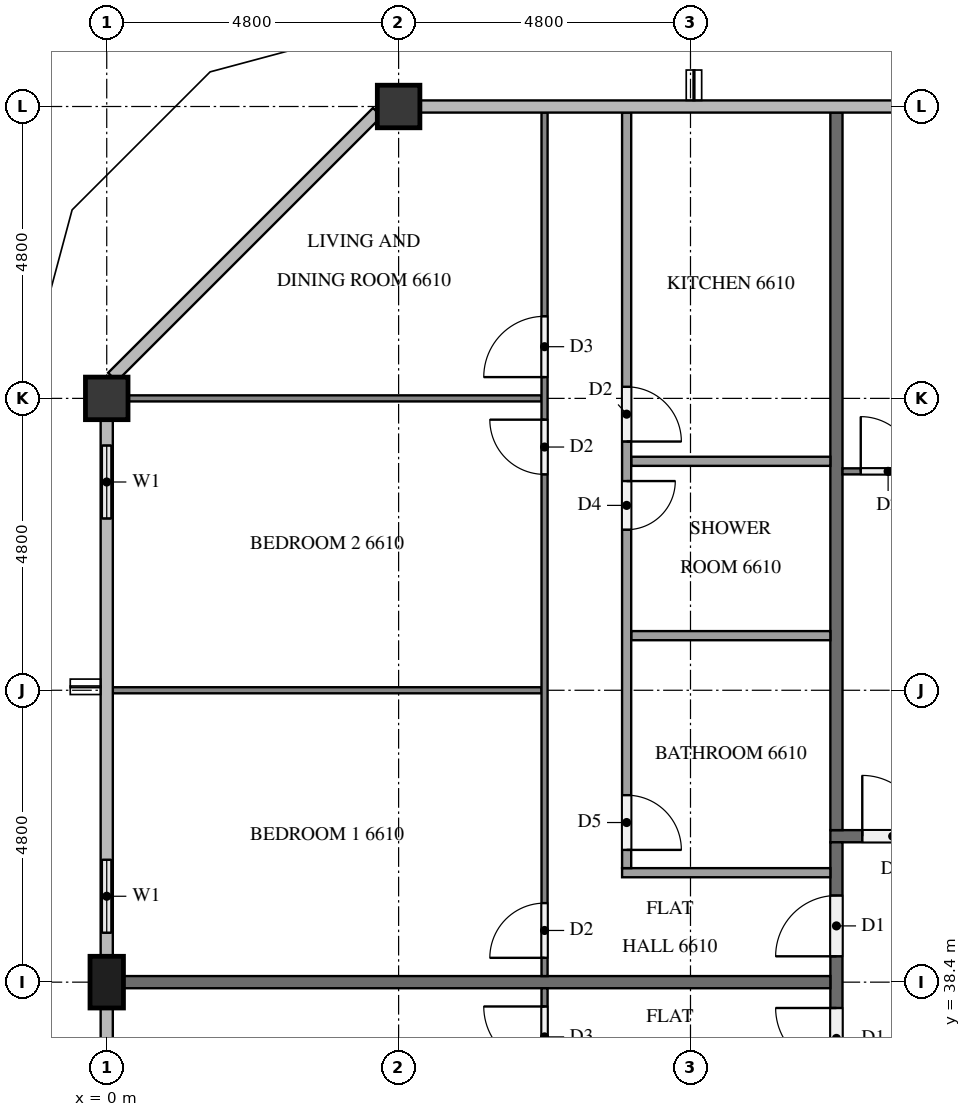
"""IFC4 building model, lengths in metres.
Left out: names, types, materials, properties, quantities, classifications, styles, units other than length and angle.
Written with IfcOpenShell. Run it as: python <this file> out.ifc"""

import sys

from ifc_helpers import new_model, si_unit, direction, frame, frame_2d, origin, origin_2d, place, context, subcontext, project, spatial, rectangle, extrude, element, fill, save


model = new_model("IFC4")
c1 = context("Model", 3, precision=1e-05, world=origin(), true_north=direction((0.0, 1.0)))
c2 = subcontext(c1, "Body", "Model", "MODEL_VIEW")
j1 = project(units=[si_unit("LENGTHUNIT", "METRE"), si_unit("PLANEANGLEUNIT", "RADIAN")], contexts=[c1])
p1 = place(None, origin())
s1 = spatial("IfcSite", under=j1, at=p1, CompositionType="ELEMENT")
p2 = place(p1, origin())
s2 = spatial("IfcBuilding", under=s1, at=p2, CompositionType="ELEMENT")
p3 = place(p2, frame((0.0, 0.0, 252.7)))
s3 = spatial("IfcBuildingStorey", under=s2, at=p3, CompositionType="ELEMENT", Elevation=252.7)
for number, where, z_axis, x_axis in (
    (1, (4.8, 52.8, 0.0), (0.0, 0.0, 1.0), (1.0, 0.0, 0.0)),
    (2, (0.0, 48.0, 0.0), (0.0, 0.0, 1.0), (1.0, 0.0, 0.0)),
):
    element("IfcColumn", number, at=place(p3, frame(where, z_axis=z_axis, x_axis=x_axis)), inside=s3, PredefinedType="COLUMN", context=c2, shape_type="SweptSolid", body=[
        extrude(rectangle(XDim=0.7, YDim=0.7, at=origin_2d()), origin(), (0.0, 0.0, 1.0), 3.2),
    ])
p4 = place(p3, frame((0.0, 38.4, 0.0), z_axis=(0.0, 0.0, 1.0), x_axis=(0.0, 1.0, 0.0)))
e3 = element("IfcColumn", 3, at=p4, inside=s3, PredefinedType="COLUMN", context=c2, shape_type="SweptSolid", body=[
    extrude(rectangle(XDim=0.85, YDim=0.55, at=origin_2d()), origin(), (0.0, 0.0, 1.0), 3.2),
])
p5 = place(p3, frame((0.0, 47.65, 0.0), z_axis=(0.0, 0.0, 1.0), x_axis=(0.0, -1.0, 0.0)))
e4 = element("IfcWall", 4, at=p5, inside=s3, PredefinedType="SOLIDWALL", context=c2, shape_type="SweptSolid", body=[
    extrude(rectangle(XDim=2.05, YDim=0.15, at=frame_2d((1.025, 0.0))), origin(), (0.0, 0.0, 1.0), 3.2),
])
p6 = place(p5, frame((0.425, 0.0, 0.9)))
e5 = element("IfcOpeningElement", 5, at=p6, cuts=e4, PredefinedType="OPENING", context=c2, shape_type="SweptSolid", body=[
    extrude(rectangle(XDim=1.2, YDim=1.4, at=frame_2d((0.6, 0.7))), frame((0.0, 0.085, 0.0), z_axis=(0.0, -1.0, 0.0), x_axis=(1.0, 0.0, 0.0)), (0.0, 0.0, 1.0), 0.17),
])
p7 = place(p3, frame((0.0, 40.8, 0.0), z_axis=(0.0, 0.0, 1.0), x_axis=(0.0, -1.0, 0.0)))
e6 = element("IfcWall", 6, at=p7, inside=s3, PredefinedType="SOLIDWALL", context=c2, shape_type="SweptSolid", body=[
    extrude(rectangle(XDim=1.975, YDim=0.15, at=frame_2d((0.988, 0.0))), origin(), (0.0, 0.0, 1.0), 3.2),
])
p8 = place(p7, frame((0.387, 0.0, 0.9)))
e7 = element("IfcOpeningElement", 7, at=p8, cuts=e6, PredefinedType="OPENING", context=c2, shape_type="SweptSolid", body=[
    extrude(rectangle(XDim=1.2, YDim=1.4, at=frame_2d((0.6, 0.7))), frame((0.0, 0.085, 0.0), z_axis=(0.0, -1.0, 0.0), x_axis=(1.0, 0.0, 0.0)), (0.0, 0.0, 1.0), 0.17),
])
p9 = place(p3, frame((11.9, 40.8, 0.0), z_axis=(0.0, 0.0, 1.0), x_axis=(1.0, 0.0, 0.0)))
e8 = element("IfcWall", 8, at=p9, inside=s3, PredefinedType="PARTITIONING", context=c2, shape_type="SweptSolid", body=[
    extrude(rectangle(XDim=38.6, YDim=0.2, at=frame_2d((19.3, 0.0))), origin(), (0.0, 0.0, 1.0), 3.2),
])
p10 = place(p9, frame((31.725, 0.0, 0.0)))
e9 = element("IfcOpeningElement", 9, at=p10, cuts=e8, PredefinedType="OPENING", context=c2, shape_type="SweptSolid", body=[
    extrude(rectangle(XDim=1.0, YDim=2.1, at=frame_2d((0.5, 1.05))), frame((0.0, 0.11, 0.0), z_axis=(0.0, -1.0, 0.0), x_axis=(1.0, 0.0, 0.0)), (0.0, 0.0, 1.0), 0.22),
])
p11 = place(p9, frame((17.325, 0.0, 0.0)))
e10 = element("IfcOpeningElement", 10, at=p11, cuts=e8, PredefinedType="OPENING", context=c2, shape_type="SweptSolid", body=[
    extrude(rectangle(XDim=1.0, YDim=2.1, at=frame_2d((0.5, 1.05))), frame((0.0, 0.11, 0.0), z_axis=(0.0, -1.0, 0.0), x_axis=(1.0, 0.0, 0.0)), (0.0, 0.0, 1.0), 0.22),
])
p12 = place(p9, frame((0.525, 0.0, 0.0)))
e11 = element("IfcOpeningElement", 11, at=p12, cuts=e8, PredefinedType="OPENING", context=c2, shape_type="SweptSolid", body=[
    extrude(rectangle(XDim=1.0, YDim=2.1, at=frame_2d((0.5, 1.05))), frame((0.0, 0.11, 0.0), z_axis=(0.0, -1.0, 0.0), x_axis=(1.0, 0.0, 0.0)), (0.0, 0.0, 1.0), 0.22),
])
p13 = place(p3, frame((12.0, 12.1, 0.0), z_axis=(0.0, 0.0, 1.0), x_axis=(0.0, 1.0, 0.0)))
e12 = element("IfcWall", 12, at=p13, inside=s3, PredefinedType="PARTITIONING", context=c2, shape_type="SweptSolid", body=[
    extrude(rectangle(XDim=28.6, YDim=0.2, at=frame_2d((14.3, 0.0))), origin(), (0.0, 0.0, 1.0), 3.2),
])
p14 = place(p13, frame((26.725, 0.0, 0.0)))
e13 = element("IfcOpeningElement", 13, at=p14, cuts=e12, PredefinedType="OPENING", context=c2, shape_type="SweptSolid", body=[
    extrude(rectangle(XDim=1.0, YDim=2.1, at=frame_2d((0.5, 1.05))), frame((0.0, 0.11, 0.0), z_axis=(0.0, -1.0, 0.0), x_axis=(1.0, 0.0, 0.0)), (0.0, 0.0, 1.0), 0.22),
])
p15 = place(p13, frame((24.875, 0.0, 0.0)))
e14 = element("IfcOpeningElement", 14, at=p15, cuts=e12, PredefinedType="OPENING", context=c2, shape_type="SweptSolid", body=[
    extrude(rectangle(XDim=1.0, YDim=2.1, at=frame_2d((0.5, 1.05))), frame((0.0, 0.11, 0.0), z_axis=(0.0, -1.0, 0.0), x_axis=(1.0, 0.0, 0.0)), (0.0, 0.0, 1.0), 0.22),
])
p16 = place(p13, frame((17.675, 0.0, 0.0)))
e15 = element("IfcOpeningElement", 15, at=p16, cuts=e12, PredefinedType="OPENING", context=c2, shape_type="SweptSolid", body=[
    extrude(rectangle(XDim=1.0, YDim=2.1, at=frame_2d((0.5, 1.05))), frame((0.0, 0.11, 0.0), z_axis=(0.0, -1.0, 0.0), x_axis=(1.0, 0.0, 0.0)), (0.0, 0.0, 1.0), 0.22),
])
p17 = place(p13, frame((2.725, 0.0, 0.0)))
e16 = element("IfcOpeningElement", 16, at=p17, cuts=e12, PredefinedType="OPENING", context=c2, shape_type="SweptSolid", body=[
    extrude(rectangle(XDim=1.0, YDim=2.1, at=frame_2d((0.5, 1.05))), frame((0.0, 0.11, 0.0), z_axis=(0.0, -1.0, 0.0), x_axis=(1.0, 0.0, 0.0)), (0.0, 0.0, 1.0), 0.22),
])
p18 = place(p13, frame((0.875, 0.0, 0.0)))
e17 = element("IfcOpeningElement", 17, at=p18, cuts=e12, PredefinedType="OPENING", context=c2, shape_type="SweptSolid", body=[
    extrude(rectangle(XDim=1.0, YDim=2.1, at=frame_2d((0.5, 1.05))), frame((0.0, 0.11, 0.0), z_axis=(0.0, -1.0, 0.0), x_axis=(1.0, 0.0, 0.0)), (0.0, 0.0, 1.0), 0.22),
])
p19 = place(p3, frame((12.0, 52.7, 0.0), z_axis=(0.0, 0.0, 1.0), x_axis=(0.0, -1.0, 0.0)))
e18 = element("IfcWall", 18, at=p19, inside=s3, PredefinedType="PARTITIONING", context=c2, shape_type="SweptSolid", body=[
    extrude(rectangle(XDim=11.8, YDim=0.2, at=frame_2d((5.9, 0.0))), origin(), (0.0, 0.0, 1.0), 3.2),
])
p20 = place(p3, frame((0.275, 38.4, 0.0), z_axis=(0.0, 0.0, 1.0), x_axis=(1.0, 0.0, 0.0)))
e19 = element("IfcWall", 19, at=p20, inside=s3, PredefinedType="PARTITIONING", context=c2, shape_type="SweptSolid", body=[
    extrude(rectangle(XDim=11.625, YDim=0.2, at=frame_2d((5.812, 0.0))), origin(), (0.0, 0.0, 1.0), 3.2),
])
p21 = place(p3, frame((12.1, 46.8, 0.0), z_axis=(0.0, 0.0, 1.0), x_axis=(1.0, 0.0, 0.0)))
e20 = element("IfcWall", 20, at=p21, inside=s3, PredefinedType="PARTITIONING", context=c2, shape_type="SweptSolid", body=[
    extrude(rectangle(XDim=16.6, YDim=0.1, at=frame_2d((8.3, 0.0))), origin(), (0.0, 0.0, 1.0), 3.2),
])
p22 = place(p21, frame((0.3, 0.0, 0.0)))
e21 = element("IfcOpeningElement", 21, at=p22, cuts=e20, PredefinedType="OPENING", context=c2, shape_type="SweptSolid", body=[
    extrude(rectangle(XDim=0.9, YDim=2.1, at=frame_2d((0.45, 1.05))), frame((0.0, 0.06, 0.0), z_axis=(0.0, -1.0, 0.0), x_axis=(1.0, 0.0, 0.0)), (0.0, 0.0, 1.0), 0.12),
])
p23 = place(p21, frame((8.25, 0.0, 0.0)))
e22 = element("IfcOpeningElement", 22, at=p23, cuts=e20, PredefinedType="OPENING", context=c2, shape_type="SweptSolid", body=[
    extrude(rectangle(XDim=0.9, YDim=2.1, at=frame_2d((0.45, 1.05))), frame((0.0, 0.06, 0.0), z_axis=(0.0, -1.0, 0.0), x_axis=(1.0, 0.0, 0.0)), (0.0, 0.0, 1.0), 0.12),
])
p24 = place(p21, frame((9.85, 0.0, 0.0)))
e23 = element("IfcOpeningElement", 23, at=p24, cuts=e20, PredefinedType="OPENING", context=c2, shape_type="SweptSolid", body=[
    extrude(rectangle(XDim=1.0, YDim=2.1, at=frame_2d((0.5, 1.05))), frame((0.0, 0.06, 0.0), z_axis=(0.0, -1.0, 0.0), x_axis=(1.0, 0.0, 0.0)), (0.0, 0.0, 1.0), 0.12),
])
p25 = place(p3, frame((7.15, 43.2, 0.0), z_axis=(0.0, 0.0, 1.0), x_axis=(-1.0, 0.0, 0.0)))
e24 = element("IfcWall", 24, at=p25, inside=s3, PredefinedType="PARTITIONING", context=c2, shape_type="SweptSolid", body=[
    extrude(rectangle(XDim=7.05, YDim=0.1, at=frame_2d((3.525, 0.0))), origin(), (0.0, 0.0, 1.0), 3.2),
])
p26 = place(p3, frame((7.15, 48.0, 0.0), z_axis=(0.0, 0.0, 1.0), x_axis=(-1.0, 0.0, 0.0)))
e25 = element("IfcWall", 25, at=p26, inside=s3, PredefinedType="PARTITIONING", context=c2, shape_type="SweptSolid", body=[
    extrude(rectangle(XDim=6.8, YDim=0.1, at=frame_2d((3.4, 0.0))), origin(), (0.0, 0.0, 1.0), 3.2),
])
p27 = place(p3, frame((7.2, 38.5, 0.0), z_axis=(0.0, 0.0, 1.0), x_axis=(0.0, 1.0, 0.0)))
e26 = element("IfcWall", 26, at=p27, inside=s3, PredefinedType="PARTITIONING", context=c2, shape_type="SweptSolid", body=[
    extrude(rectangle(XDim=14.2, YDim=0.1, at=frame_2d((7.1, 0.0))), origin(), (0.0, 0.0, 1.0), 3.2),
])
p28 = place(p27, frame((0.3, 0.0, 0.0)))
e27 = element("IfcOpeningElement", 27, at=p28, cuts=e26, PredefinedType="OPENING", context=c2, shape_type="SweptSolid", body=[
    extrude(rectangle(XDim=0.9, YDim=2.1, at=frame_2d((0.45, 1.05))), frame((0.0, 0.06, 0.0), z_axis=(0.0, -1.0, 0.0), x_axis=(1.0, 0.0, 0.0)), (0.0, 0.0, 1.0), 0.12),
])
p29 = place(p27, frame((8.25, 0.0, 0.0)))
e28 = element("IfcOpeningElement", 28, at=p29, cuts=e26, PredefinedType="OPENING", context=c2, shape_type="SweptSolid", body=[
    extrude(rectangle(XDim=0.9, YDim=2.1, at=frame_2d((0.45, 1.05))), frame((0.0, 0.06, 0.0), z_axis=(0.0, -1.0, 0.0), x_axis=(1.0, 0.0, 0.0)), (0.0, 0.0, 1.0), 0.12),
])
p30 = place(p27, frame((9.85, 0.0, 0.0)))
e29 = element("IfcOpeningElement", 29, at=p30, cuts=e26, PredefinedType="OPENING", context=c2, shape_type="SweptSolid", body=[
    extrude(rectangle(XDim=1.0, YDim=2.1, at=frame_2d((0.5, 1.05))), frame((0.0, 0.06, 0.0), z_axis=(0.0, -1.0, 0.0), x_axis=(1.0, 0.0, 0.0)), (0.0, 0.0, 1.0), 0.12),
])
for number, where, z_axis, x_axis in (
    (30, (11.9, 44.098, 0.0), (0.0, 0.0, 1.0), (-1.0, 0.0, 0.0)),
    (31, (11.9, 46.965, 0.0), (0.0, 0.0, 1.0), (-1.0, 0.0, 0.0)),
):
    element("IfcWall", number, at=place(p3, frame(where, z_axis=z_axis, x_axis=x_axis)), inside=s3, PredefinedType="PARTITIONING", context=c2, shape_type="SweptSolid", body=[
        extrude(rectangle(XDim=3.275, YDim=0.15, at=frame_2d((1.637, 0.0))), origin(), (0.0, 0.0, 1.0), 3.2),
    ])
p31 = place(p3, frame((11.9, 40.2, 0.0), z_axis=(0.0, 0.0, 1.0), x_axis=(-1.0, 0.0, 0.0)))
e32 = element("IfcWall", 32, at=p31, inside=s3, PredefinedType="PARTITIONING", context=c2, shape_type="SweptSolid", body=[
    extrude(rectangle(XDim=3.425, YDim=0.15, at=frame_2d((1.712, 0.0))), origin(), (0.0, 0.0, 1.0), 3.2),
])
p32 = place(p3, frame((8.55, 52.7, 0.0), z_axis=(0.0, 0.0, 1.0), x_axis=(0.0, -1.0, 0.0)))
e33 = element("IfcWall", 33, at=p32, inside=s3, PredefinedType="PARTITIONING", context=c2, shape_type="SweptSolid", body=[
    extrude(rectangle(XDim=12.425, YDim=0.15, at=frame_2d((6.212, 0.0))), origin(), (0.0, 0.0, 1.0), 3.2),
])
p33 = place(p32, frame((11.225, 0.0, 0.0)))
e34 = element("IfcOpeningElement", 34, at=p33, cuts=e33, PredefinedType="OPENING", context=c2, shape_type="SweptSolid", body=[
    extrude(rectangle(XDim=0.9, YDim=2.1, at=frame_2d((0.45, 1.05))), frame((0.0, 0.085, 0.0), z_axis=(0.0, -1.0, 0.0), x_axis=(1.0, 0.0, 0.0)), (0.0, 0.0, 1.0), 0.17),
])
p34 = place(p32, frame((6.06, 0.0, 0.0)))
e35 = element("IfcOpeningElement", 35, at=p34, cuts=e33, PredefinedType="OPENING", context=c2, shape_type="SweptSolid", body=[
    extrude(rectangle(XDim=0.8, YDim=2.1, at=frame_2d((0.4, 1.05))), frame((0.0, 0.085, 0.0), z_axis=(0.0, -1.0, 0.0), x_axis=(1.0, 0.0, 0.0)), (0.0, 0.0, 1.0), 0.17),
])
p35 = place(p32, frame((4.51, 0.0, 0.0)))
e36 = element("IfcOpeningElement", 36, at=p35, cuts=e33, PredefinedType="OPENING", context=c2, shape_type="SweptSolid", body=[
    extrude(rectangle(XDim=0.9, YDim=2.1, at=frame_2d((0.45, 1.05))), frame((0.0, 0.085, 0.0), z_axis=(0.0, -1.0, 0.0), x_axis=(1.0, 0.0, 0.0)), (0.0, 0.0, 1.0), 0.17),
])
p36 = place(p3, frame((7.2, 31.3, 0.0), z_axis=(0.0, 0.0, 1.0), x_axis=(0.0, 1.0, 0.0)))
e37 = element("IfcWall", 37, at=p36, inside=s3, PredefinedType="PARTITIONING", context=c2, shape_type="SweptSolid", body=[
    extrude(rectangle(XDim=7.0, YDim=0.1, at=frame_2d((3.5, 0.0))), origin(), (0.0, 0.0, 1.0), 3.2),
])
p37 = place(p36, frame((5.7, 0.0, 0.0)))
e38 = element("IfcOpeningElement", 38, at=p37, cuts=e37, PredefinedType="OPENING", context=c2, shape_type="SweptSolid", body=[
    extrude(rectangle(XDim=1.0, YDim=2.1, at=frame_2d((0.5, 1.05))), frame((0.0, 0.06, 0.0), z_axis=(0.0, -1.0, 0.0), x_axis=(1.0, 0.0, 0.0)), (0.0, 0.0, 1.0), 0.12),
])
p38 = place(p6, origin())
e39 = element("IfcWindow", 39, at=p38, inside=s3, PartitioningType="SINGLE_PANEL", PredefinedType="WINDOW", context=c2, shape_type="SweptSolid", body=[
    extrude(rectangle(XDim=1.2, YDim=1.4, at=frame_2d((0.6, 0.7))), frame((0.0, 0.03, 0.0), z_axis=(0.0, -1.0, 0.0), x_axis=(1.0, 0.0, 0.0)), (0.0, 0.0, 1.0), 0.06),
])
fill(e5, e39)
p39 = place(p8, origin())
e40 = element("IfcWindow", 40, at=p39, inside=s3, PartitioningType="SINGLE_PANEL", PredefinedType="WINDOW", context=c2, shape_type="SweptSolid", body=[
    extrude(rectangle(XDim=1.2, YDim=1.4, at=frame_2d((0.6, 0.7))), frame((0.0, 0.03, 0.0), z_axis=(0.0, -1.0, 0.0), x_axis=(1.0, 0.0, 0.0)), (0.0, 0.0, 1.0), 0.06),
])
fill(e7, e40)
p40 = place(p12, origin())
e41 = element("IfcDoor", 41, at=p40, inside=s3, OperationType="SINGLE_SWING_LEFT", PredefinedType="DOOR", context=c2, shape_type="SweptSolid", body=[
    extrude(rectangle(XDim=1.0, YDim=2.1, at=frame_2d((0.5, 1.05))), frame((0.0, 0.025, 0.0), z_axis=(0.0, -1.0, 0.0), x_axis=(1.0, 0.0, 0.0)), (0.0, 0.0, 1.0), 0.05),
])
fill(e11, e41)
p41 = place(p14, origin())
e42 = element("IfcDoor", 42, at=p41, inside=s3, OperationType="SINGLE_SWING_LEFT", PredefinedType="DOOR", context=c2, shape_type="SweptSolid", body=[
    extrude(rectangle(XDim=1.0, YDim=2.1, at=frame_2d((0.5, 1.05))), frame((0.0, 0.025, 0.0), z_axis=(0.0, -1.0, 0.0), x_axis=(1.0, 0.0, 0.0)), (0.0, 0.0, 1.0), 0.05),
])
fill(e13, e42)
p42 = place(p15, origin())
e43 = element("IfcDoor", 43, at=p42, inside=s3, OperationType="SINGLE_SWING_RIGHT", PredefinedType="DOOR", context=c2, shape_type="SweptSolid", body=[
    extrude(rectangle(XDim=1.0, YDim=2.1, at=frame_2d((0.5, 1.05))), frame((0.0, 0.025, 0.0), z_axis=(0.0, -1.0, 0.0), x_axis=(1.0, 0.0, 0.0)), (0.0, 0.0, 1.0), 0.05),
])
fill(e14, e43)
p43 = place(p22, origin())
e44 = element("IfcDoor", 44, at=p43, inside=s3, OperationType="SINGLE_SWING_LEFT", PredefinedType="DOOR", context=c2, shape_type="SweptSolid", body=[
    extrude(rectangle(XDim=0.9, YDim=2.1, at=frame_2d((0.45, 1.05))), frame((0.0, 0.025, 0.0), z_axis=(0.0, -1.0, 0.0), x_axis=(1.0, 0.0, 0.0)), (0.0, 0.0, 1.0), 0.05),
])
fill(e21, e44)
p44 = place(p28, origin())
e45 = element("IfcDoor", 45, at=p44, inside=s3, OperationType="SINGLE_SWING_LEFT", PredefinedType="DOOR", context=c2, shape_type="SweptSolid", body=[
    extrude(rectangle(XDim=0.9, YDim=2.1, at=frame_2d((0.45, 1.05))), frame((0.0, 0.025, 0.0), z_axis=(0.0, -1.0, 0.0), x_axis=(1.0, 0.0, 0.0)), (0.0, 0.0, 1.0), 0.05),
])
fill(e27, e45)
p45 = place(p29, origin())
e46 = element("IfcDoor", 46, at=p45, inside=s3, OperationType="SINGLE_SWING_RIGHT", PredefinedType="DOOR", context=c2, shape_type="SweptSolid", body=[
    extrude(rectangle(XDim=0.9, YDim=2.1, at=frame_2d((0.45, 1.05))), frame((0.0, 0.025, 0.0), z_axis=(0.0, -1.0, 0.0), x_axis=(1.0, 0.0, 0.0)), (0.0, 0.0, 1.0), 0.05),
])
fill(e28, e46)
p46 = place(p30, origin())
e47 = element("IfcDoor", 47, at=p46, inside=s3, OperationType="SINGLE_SWING_LEFT", PredefinedType="DOOR", context=c2, shape_type="SweptSolid", body=[
    extrude(rectangle(XDim=1.0, YDim=2.1, at=frame_2d((0.5, 1.05))), frame((0.0, 0.025, 0.0), z_axis=(0.0, -1.0, 0.0), x_axis=(1.0, 0.0, 0.0)), (0.0, 0.0, 1.0), 0.05),
])
fill(e29, e47)
p47 = place(p33, origin())
e48 = element("IfcDoor", 48, at=p47, inside=s3, OperationType="SINGLE_SWING_RIGHT", PredefinedType="DOOR", context=c2, shape_type="SweptSolid", body=[
    extrude(rectangle(XDim=0.9, YDim=2.1, at=frame_2d((0.45, 1.05))), frame((0.0, 0.025, 0.0), z_axis=(0.0, -1.0, 0.0), x_axis=(1.0, 0.0, 0.0)), (0.0, 0.0, 1.0), 0.05),
])
fill(e34, e48)
p48 = place(p34, origin())
e49 = element("IfcDoor", 49, at=p48, inside=s3, OperationType="SINGLE_SWING_LEFT", PredefinedType="DOOR", context=c2, shape_type="SweptSolid", body=[
    extrude(rectangle(XDim=0.8, YDim=2.1, at=frame_2d((0.4, 1.05))), frame((0.0, 0.025, 0.0), z_axis=(0.0, -1.0, 0.0), x_axis=(1.0, 0.0, 0.0)), (0.0, 0.0, 1.0), 0.05),
])
fill(e35, e49)
p49 = place(p35, origin())
e50 = element("IfcDoor", 50, at=p49, inside=s3, OperationType="SINGLE_SWING_RIGHT", PredefinedType="DOOR", context=c2, shape_type="SweptSolid", body=[
    extrude(rectangle(XDim=0.9, YDim=2.1, at=frame_2d((0.45, 1.05))), frame((0.0, 0.025, 0.0), z_axis=(0.0, -1.0, 0.0), x_axis=(1.0, 0.0, 0.0)), (0.0, 0.0, 1.0), 0.05),
])
fill(e36, e50)
p50 = place(p37, origin())
e51 = element("IfcDoor", 51, at=p50, inside=s3, OperationType="SINGLE_SWING_RIGHT", PredefinedType="DOOR", context=c2, shape_type="SweptSolid", body=[
    extrude(rectangle(XDim=1.0, YDim=2.1, at=frame_2d((0.5, 1.05))), frame((0.0, 0.025, 0.0), z_axis=(0.0, -1.0, 0.0), x_axis=(1.0, 0.0, 0.0)), (0.0, 0.0, 1.0), 0.05),
])
fill(e38, e51)
save(model, sys.argv[1])
